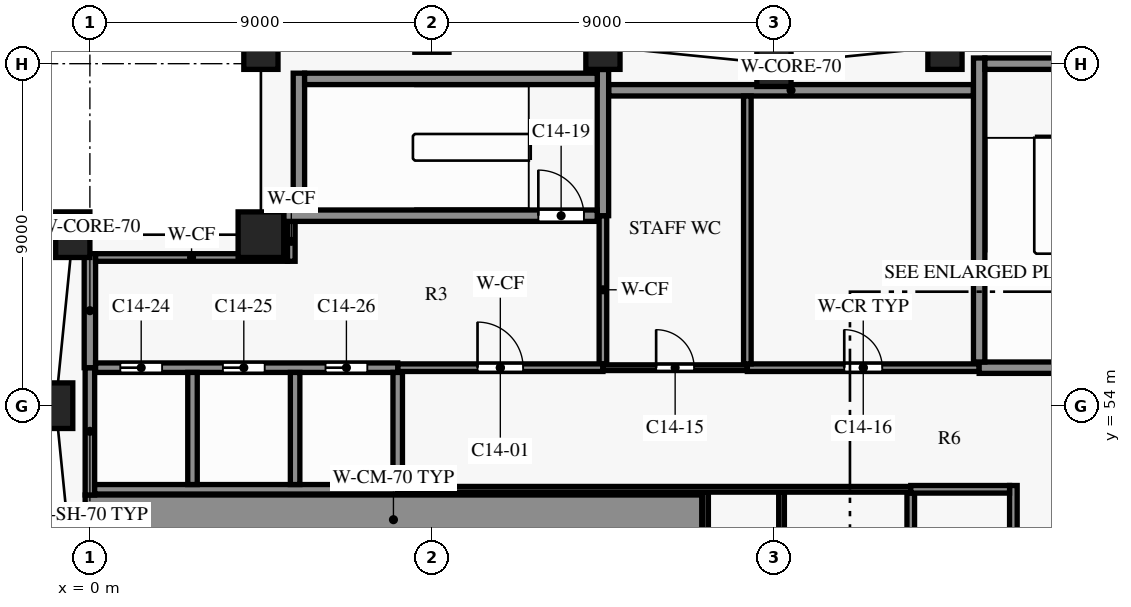
"""IFC4 building model, lengths in metres.
Left out: names, types, materials, properties, quantities, classifications, styles, units other than length and angle.
Written with IfcOpenShell. Run it as: python <this file> out.ifc"""

import sys

from ifc_helpers import new_model, si_unit, direction, frame, frame_2d, origin, origin_2d, place, context, subcontext, project, spatial, rectangle, extrude, element, fill, save


model = new_model("IFC4")
c1 = context("Model", 3, precision=1e-05, world=origin(), true_north=direction((0.0, 1.0)))
c2 = subcontext(c1, "Body", "Model", "MODEL_VIEW")
j1 = project(units=[si_unit("LENGTHUNIT", "METRE"), si_unit("PLANEANGLEUNIT", "RADIAN")], contexts=[c1])
p1 = place(None, origin())
s1 = spatial("IfcSite", under=j1, at=p1, CompositionType="ELEMENT")
p2 = place(p1, origin())
s2 = spatial("IfcBuilding", under=s1, at=p2, CompositionType="ELEMENT")
p3 = place(p2, frame((0.0, 0.0, 92.3)))
s3 = spatial("IfcBuildingStorey", under=s2, at=p3, CompositionType="ELEMENT", Elevation=92.3)
for number, where, z_axis, x_axis in (
    (1, (22.5, 63.45, 0.0), (0.0, 0.0, 1.0), (-0.995, -0.1, 0.0)),
    (2, (18.0, 63.0, 0.0), (0.0, 0.0, 1.0), (-1.0, 0.0, 0.0)),
    (3, (13.5, 63.45, 0.0), (0.0, 0.0, 1.0), (-0.995, 0.1, 0.0)),
    (4, (9.0, 63.9, 0.0), (0.0, 0.0, 1.0), (-1.0, 0.0, 0.0)),
    (5, (4.5, 63.45, 0.0), (0.0, 0.0, 1.0), (-0.995, -0.1, 0.0)),
    (6, (-0.45, 58.5, 0.0), (0.0, 0.0, 1.0), (-0.1, -0.995, 0.0)),
    (7, (-0.9, 54.0, 0.0), (0.0, 0.0, 1.0), (0.0, -1.0, 0.0)),
):
    element("IfcColumn", number, at=place(p3, frame(where, z_axis=z_axis, x_axis=x_axis)), inside=s3, PredefinedType="COLUMN", context=c2, shape_type="SweptSolid", body=[
        extrude(rectangle(XDim=0.9, YDim=1.2, at=origin_2d()), origin(), (0.0, 0.0, 1.0), 3.8),
    ])
p4 = place(p3, frame((4.5, 58.5, 0.0), z_axis=(0.0, 0.0, 1.0), x_axis=(1.0, 0.0, 0.0)))
e8 = element("IfcColumn", 8, at=p4, inside=s3, PredefinedType="COLUMN", context=c2, shape_type="SweptSolid", body=[
    extrude(rectangle(XDim=1.2, YDim=1.2, at=origin_2d()), origin(), (0.0, 0.0, 1.0), 3.8),
])
p5 = place(p3, frame((-0.125, 51.0, 0.0), z_axis=(0.0, 0.0, 1.0), x_axis=(1.0, 0.0, 0.0)))
e9 = element("IfcWall", 9, at=p5, inside=s3, PredefinedType="SHEAR", context=c2, shape_type="SweptSolid", body=[
    extrude(rectangle(XDim=16.225, YDim=1.3, at=frame_2d((8.113, 0.0))), origin(), (0.0, 0.0, 1.0), 3.5),
])
p6 = place(p3, frame((8.1, 51.8, 0.0), z_axis=(0.0, 0.0, 1.0), x_axis=(1.0, 0.0, 0.0)))
e10 = element("IfcWall", 10, at=p6, inside=s3, PredefinedType="PARTITIONING", context=c2, shape_type="SweptSolid", body=[
    extrude(rectangle(XDim=13.5, YDim=0.15, at=frame_2d((6.75, 0.0))), origin(), (0.0, 0.0, 1.0), 3.5),
])
p7 = place(p3, frame((21.6, 51.8, 0.0), z_axis=(0.0, 0.0, 1.0), x_axis=(1.0, 0.0, 0.0)))
e11 = element("IfcWall", 11, at=p7, inside=s3, PredefinedType="PARTITIONING", context=c2, shape_type="SweptSolid", body=[
    extrude(rectangle(XDim=2.6, YDim=0.2, at=frame_2d((1.3, 0.0))), origin(), (0.0, 0.0, 1.0), 3.5),
])
p8 = place(p3, frame((0.125, 51.8, 0.0), z_axis=(0.0, 0.0, 1.0), x_axis=(1.0, 0.0, 0.0)))
e12 = element("IfcWall", 12, at=p8, inside=s3, PredefinedType="SHEAR", context=c2, shape_type="SweptSolid", body=[
    extrude(rectangle(XDim=7.975, YDim=0.25, at=frame_2d((3.988, 0.0))), origin(), (0.0, 0.0, 1.0), 3.5),
])
p9 = place(p3, frame((8.1, 55.0, 0.0), z_axis=(0.0, 0.0, 1.0), x_axis=(1.0, 0.0, 0.0)))
e13 = element("IfcWall", 13, at=p9, inside=s3, PredefinedType="PARTITIONING", context=c2, shape_type="SweptSolid", body=[
    extrude(rectangle(XDim=5.4, YDim=0.2, at=frame_2d((2.7, 0.0))), origin(), (0.0, 0.0, 1.0), 3.5),
])
p10 = place(p9, frame((2.1, 0.0, 0.0)))
e14 = element("IfcOpeningElement", 14, at=p10, cuts=e13, PredefinedType="OPENING", context=c2, shape_type="SweptSolid", body=[
    extrude(rectangle(XDim=1.2, YDim=2.2, at=frame_2d((0.6, 1.1))), frame((0.0, 0.11, 0.0), z_axis=(0.0, -1.0, 0.0), x_axis=(1.0, 0.0, 0.0)), (0.0, 0.0, 1.0), 0.22),
])
p11 = place(p3, frame((13.5, 55.0, 0.0), z_axis=(0.0, 0.0, 1.0), x_axis=(1.0, 0.0, 0.0)))
e15 = element("IfcWall", 15, at=p11, inside=s3, PredefinedType="PARTITIONING", context=c2, shape_type="SweptSolid", body=[
    extrude(rectangle(XDim=3.8, YDim=0.15, at=frame_2d((1.9, 0.0))), origin(), (0.0, 0.0, 1.0), 3.5),
])
p12 = place(p11, frame((1.4, 0.0, 0.0)))
e16 = element("IfcOpeningElement", 16, at=p12, cuts=e15, PredefinedType="OPENING", context=c2, shape_type="SweptSolid", body=[
    extrude(rectangle(XDim=1.0, YDim=2.1, at=frame_2d((0.5, 1.05))), frame((0.0, 0.085, 0.0), z_axis=(0.0, -1.0, 0.0), x_axis=(1.0, 0.0, 0.0)), (0.0, 0.0, 1.0), 0.17),
])
p13 = place(p3, frame((17.3, 55.0, 0.0), z_axis=(0.0, 0.0, 1.0), x_axis=(1.0, 0.0, 0.0)))
e17 = element("IfcWall", 17, at=p13, inside=s3, PredefinedType="PARTITIONING", context=c2, shape_type="SweptSolid", body=[
    extrude(rectangle(XDim=6.1, YDim=0.2, at=frame_2d((3.05, 0.0))), origin(), (0.0, 0.0, 1.0), 3.5),
])
p14 = place(p13, frame((2.55, 0.0, 0.0)))
e18 = element("IfcOpeningElement", 18, at=p14, cuts=e17, PredefinedType="OPENING", context=c2, shape_type="SweptSolid", body=[
    extrude(rectangle(XDim=1.0, YDim=2.1, at=frame_2d((0.5, 1.05))), frame((0.0, 0.11, 0.0), z_axis=(0.0, -1.0, 0.0), x_axis=(1.0, 0.0, 0.0)), (0.0, 0.0, 1.0), 0.22),
])
p15 = place(p3, frame((0.15, 55.0, 0.0), z_axis=(0.0, 0.0, 1.0), x_axis=(1.0, 0.0, 0.0)))
e19 = element("IfcWall", 19, at=p15, inside=s3, PredefinedType="SHEAR", context=c2, shape_type="SweptSolid", body=[
    extrude(rectangle(XDim=7.95, YDim=0.25, at=frame_2d((3.975, 0.0))), origin(), (0.0, 0.0, 1.0), 3.5),
])
p16 = place(p15, frame((0.65, 0.0, 0.0)))
e20 = element("IfcOpeningElement", 20, at=p16, cuts=e19, PredefinedType="OPENING", context=c2, shape_type="SweptSolid", body=[
    extrude(rectangle(XDim=1.1, YDim=2.1, at=frame_2d((0.55, 1.05))), frame((0.0, 0.135, 0.0), z_axis=(0.0, -1.0, 0.0), x_axis=(1.0, 0.0, 0.0)), (0.0, 0.0, 1.0), 0.27),
])
p17 = place(p15, frame((3.35, 0.0, 0.0)))
e21 = element("IfcOpeningElement", 21, at=p17, cuts=e19, PredefinedType="OPENING", context=c2, shape_type="SweptSolid", body=[
    extrude(rectangle(XDim=1.1, YDim=2.1, at=frame_2d((0.55, 1.05))), frame((0.0, 0.135, 0.0), z_axis=(0.0, -1.0, 0.0), x_axis=(1.0, 0.0, 0.0)), (0.0, 0.0, 1.0), 0.27),
])
p18 = place(p15, frame((6.05, 0.0, 0.0)))
e22 = element("IfcOpeningElement", 22, at=p18, cuts=e19, PredefinedType="OPENING", context=c2, shape_type="SweptSolid", body=[
    extrude(rectangle(XDim=1.1, YDim=2.1, at=frame_2d((0.55, 1.05))), frame((0.0, 0.135, 0.0), z_axis=(0.0, -1.0, 0.0), x_axis=(1.0, 0.0, 0.0)), (0.0, 0.0, 1.0), 0.27),
])
p19 = place(p3, frame((23.4, 55.0, 0.0), z_axis=(0.0, 0.0, 1.0), x_axis=(1.0, 0.0, 0.0)))
e23 = element("IfcWall", 23, at=p19, inside=s3, PredefinedType="SHEAR", context=c2, shape_type="SweptSolid", body=[
    extrude(rectangle(XDim=3.45, YDim=0.3, at=frame_2d((1.725, 0.0))), origin(), (0.0, 0.0, 1.0), 3.5),
])
p20 = place(p3, frame((0.15, 57.9, 0.0), z_axis=(0.0, 0.0, 1.0), x_axis=(1.0, 0.0, 0.0)))
e24 = element("IfcWall", 24, at=p20, inside=s3, PredefinedType="PARTITIONING", context=c2, shape_type="SweptSolid", body=[
    extrude(rectangle(XDim=5.05, YDim=0.2, at=frame_2d((2.525, 0.0))), origin(), (0.0, 0.0, 1.0), 3.5),
])
p21 = place(p3, frame((5.1, 59.0, 0.0), z_axis=(0.0, 0.0, 1.0), x_axis=(1.0, 0.0, 0.0)))
e25 = element("IfcWall", 25, at=p21, inside=s3, PredefinedType="SHEAR", context=c2, shape_type="SweptSolid", body=[
    extrude(rectangle(XDim=8.25, YDim=0.3, at=frame_2d((4.125, 0.0))), origin(), (0.0, 0.0, 1.0), 3.5),
])
p22 = place(p21, frame((6.7, 0.0, 0.0)))
e26 = element("IfcOpeningElement", 26, at=p22, cuts=e25, PredefinedType="OPENING", context=c2, shape_type="SweptSolid", body=[
    extrude(rectangle(XDim=1.2, YDim=2.2, at=frame_2d((0.6, 1.1))), frame((0.0, 0.16, 0.0), z_axis=(0.0, -1.0, 0.0), x_axis=(1.0, 0.0, 0.0)), (0.0, 0.0, 1.0), 0.32),
])
p23 = place(p3, frame((13.65, 62.3, 0.0), z_axis=(0.0, 0.0, 1.0), x_axis=(1.0, 0.0, 0.0)))
e27 = element("IfcWall", 27, at=p23, inside=s3, PredefinedType="SHEAR", context=c2, shape_type="SweptSolid", body=[
    extrude(rectangle(XDim=9.6, YDim=0.3, at=frame_2d((4.8, 0.0))), origin(), (0.0, 0.0, 1.0), 3.5),
])
p24 = place(p3, frame((5.65, 62.6, 0.0), z_axis=(0.0, 0.0, 1.0), x_axis=(1.0, 0.0, 0.0)))
e28 = element("IfcWall", 28, at=p24, inside=s3, PredefinedType="SHEAR", context=c2, shape_type="SweptSolid", body=[
    extrude(rectangle(XDim=7.7, YDim=0.3, at=frame_2d((3.85, 0.0))), origin(), (0.0, 0.0, 1.0), 3.5),
])
p25 = place(p3, frame((23.55, 63.0, 0.0), z_axis=(0.0, 0.0, 1.0), x_axis=(1.0, 0.0, 0.0)))
e29 = element("IfcWall", 29, at=p25, inside=s3, PredefinedType="SHEAR", context=c2, shape_type="SweptSolid", body=[
    extrude(rectangle(XDim=3.3, YDim=0.3, at=frame_2d((1.65, 0.0))), origin(), (0.0, 0.0, 1.0), 3.5),
])
p26 = place(p3, frame((0.0, 55.0, 0.0), z_axis=(0.0, 0.0, 1.0), x_axis=(0.0, 1.0, 0.0)))
e30 = element("IfcWall", 30, at=p26, inside=s3, PredefinedType="SHEAR", context=c2, shape_type="SweptSolid", body=[
    extrude(rectangle(XDim=3.0, YDim=0.3, at=frame_2d((1.5, 0.0))), origin(), (0.0, 0.0, 1.0), 3.5),
])
p27 = place(p3, frame((0.0, 51.65, 0.0), z_axis=(0.0, 0.0, 1.0), x_axis=(0.0, 1.0, 0.0)))
e31 = element("IfcWall", 31, at=p27, inside=s3, PredefinedType="SHEAR", context=c2, shape_type="SweptSolid", body=[
    extrude(rectangle(XDim=3.35, YDim=0.25, at=frame_2d((1.675, 0.0))), origin(), (0.0, 0.0, 1.0), 3.5),
])
p28 = place(p3, frame((2.7, 51.925, 0.0), z_axis=(0.0, 0.0, 1.0), x_axis=(0.0, 1.0, 0.0)))
e32 = element("IfcWall", 32, at=p28, inside=s3, PredefinedType="SHEAR", context=c2, shape_type="SweptSolid", body=[
    extrude(rectangle(XDim=2.95, YDim=0.25, at=frame_2d((1.475, 0.0))), origin(), (0.0, 0.0, 1.0), 3.5),
])
p29 = place(p3, frame((5.3, 57.8, 0.0), z_axis=(0.0, 0.0, 1.0), x_axis=(0.0, 1.0, 0.0)))
e33 = element("IfcWall", 33, at=p29, inside=s3, PredefinedType="PARTITIONING", context=c2, shape_type="SweptSolid", body=[
    extrude(rectangle(XDim=1.05, YDim=0.2, at=frame_2d((0.525, 0.0))), origin(), (0.0, 0.0, 1.0), 3.5),
])
p30 = place(p3, frame((5.4, 51.925, 0.0), z_axis=(0.0, 0.0, 1.0), x_axis=(0.0, 1.0, 0.0)))
e34 = element("IfcWall", 34, at=p30, inside=s3, PredefinedType="SHEAR", context=c2, shape_type="SweptSolid", body=[
    extrude(rectangle(XDim=2.95, YDim=0.25, at=frame_2d((1.475, 0.0))), origin(), (0.0, 0.0, 1.0), 3.5),
])
p31 = place(p3, frame((5.5, 59.15, 0.0), z_axis=(0.0, 0.0, 1.0), x_axis=(0.0, 1.0, 0.0)))
e35 = element("IfcWall", 35, at=p31, inside=s3, PredefinedType="SHEAR", context=c2, shape_type="SweptSolid", body=[
    extrude(rectangle(XDim=3.6, YDim=0.3, at=frame_2d((1.8, 0.0))), origin(), (0.0, 0.0, 1.0), 3.5),
])
p32 = place(p3, frame((8.1, 51.925, 0.0), z_axis=(0.0, 0.0, 1.0), x_axis=(0.0, 1.0, 0.0)))
e36 = element("IfcWall", 36, at=p32, inside=s3, PredefinedType="SHEAR", context=c2, shape_type="SweptSolid", body=[
    extrude(rectangle(XDim=2.95, YDim=0.25, at=frame_2d((1.475, 0.0))), origin(), (0.0, 0.0, 1.0), 3.5),
])
p33 = place(p3, frame((13.5, 55.1, 0.0), z_axis=(0.0, 0.0, 1.0), x_axis=(0.0, 1.0, 0.0)))
e37 = element("IfcWall", 37, at=p33, inside=s3, PredefinedType="PARTITIONING", context=c2, shape_type="SweptSolid", body=[
    extrude(rectangle(XDim=3.9, YDim=0.2, at=frame_2d((1.95, 0.0))), origin(), (0.0, 0.0, 1.0), 3.5),
])
p34 = place(p3, frame((13.5, 59.0, 0.0), z_axis=(0.0, 0.0, 1.0), x_axis=(0.0, 1.0, 0.0)))
e38 = element("IfcWall", 38, at=p34, inside=s3, PredefinedType="SHEAR", context=c2, shape_type="SweptSolid", body=[
    extrude(rectangle(XDim=3.847, YDim=0.3, at=frame_2d((1.923, 0.0))), origin(), (0.0, 0.0, 1.0), 3.5),
])
p35 = place(p3, frame((16.2, 50.2, 0.0), z_axis=(0.0, 0.0, 1.0), x_axis=(0.0, 1.0, 0.0)))
e39 = element("IfcWall", 39, at=p35, inside=s3, PredefinedType="PARTITIONING", context=c2, shape_type="SweptSolid", body=[
    extrude(rectangle(XDim=1.525, YDim=0.15, at=frame_2d((0.763, 0.0))), origin(), (0.0, 0.0, 1.0), 3.5),
])
p36 = place(p3, frame((17.3, 55.1, 0.0), z_axis=(0.0, 0.0, 1.0), x_axis=(0.0, 1.0, 0.0)))
e40 = element("IfcWall", 40, at=p36, inside=s3, PredefinedType="PARTITIONING", context=c2, shape_type="SweptSolid", body=[
    extrude(rectangle(XDim=7.05, YDim=0.2, at=frame_2d((3.525, 0.0))), origin(), (0.0, 0.0, 1.0), 3.5),
])
p37 = place(p3, frame((18.2, 47.1, 0.0), z_axis=(0.0, 0.0, 1.0), x_axis=(0.0, 1.0, 0.0)))
e41 = element("IfcWall", 41, at=p37, inside=s3, PredefinedType="PARTITIONING", context=c2, shape_type="SweptSolid", body=[
    extrude(rectangle(XDim=4.625, YDim=0.15, at=frame_2d((2.312, 0.0))), origin(), (0.0, 0.0, 1.0), 3.5),
])
p38 = place(p3, frame((21.6, 47.1, 0.0), z_axis=(0.0, 0.0, 1.0), x_axis=(0.0, 1.0, 0.0)))
e42 = element("IfcWall", 42, at=p38, inside=s3, PredefinedType="PARTITIONING", context=c2, shape_type="SweptSolid", body=[
    extrude(rectangle(XDim=4.6, YDim=0.2, at=frame_2d((2.3, 0.0))), origin(), (0.0, 0.0, 1.0), 3.5),
])
p39 = place(p3, frame((23.4, 55.15, 0.0), z_axis=(0.0, 0.0, 1.0), x_axis=(0.0, 1.0, 0.0)))
e43 = element("IfcWall", 43, at=p39, inside=s3, PredefinedType="SHEAR", context=c2, shape_type="SweptSolid", body=[
    extrude(rectangle(XDim=8.0, YDim=0.3, at=frame_2d((4.0, 0.0))), origin(), (0.0, 0.0, 1.0), 3.5),
])
p40 = place(p3, frame((24.3, 46.9, 0.0), z_axis=(0.0, 0.0, 1.0), x_axis=(0.0, 1.0, 0.0)))
e44 = element("IfcWall", 44, at=p40, inside=s3, PredefinedType="SHEAR", context=c2, shape_type="SweptSolid", body=[
    extrude(rectangle(XDim=5.0, YDim=0.2, at=frame_2d((2.5, 0.0))), origin(), (0.0, 0.0, 1.0), 3.5),
])
p41 = place(p10, origin())
e45 = element("IfcDoor", 45, at=p41, inside=s3, OperationType="SINGLE_SWING_RIGHT", PredefinedType="DOOR", context=c2, shape_type="SweptSolid", body=[
    extrude(rectangle(XDim=1.2, YDim=2.2, at=frame_2d((0.6, 1.1))), frame((0.0, 0.025, 0.0), z_axis=(0.0, -1.0, 0.0), x_axis=(1.0, 0.0, 0.0)), (0.0, 0.0, 1.0), 0.05),
])
fill(e14, e45)
p42 = place(p12, origin())
e46 = element("IfcDoor", 46, at=p42, inside=s3, OperationType="SINGLE_SWING_LEFT", PredefinedType="DOOR", context=c2, shape_type="SweptSolid", body=[
    extrude(rectangle(XDim=1.0, YDim=2.1, at=frame_2d((0.5, 1.05))), frame((0.0, 0.025, 0.0), z_axis=(0.0, -1.0, 0.0), x_axis=(1.0, 0.0, 0.0)), (0.0, 0.0, 1.0), 0.05),
])
fill(e16, e46)
p43 = place(p14, origin())
e47 = element("IfcDoor", 47, at=p43, inside=s3, OperationType="SINGLE_SWING_RIGHT", PredefinedType="DOOR", context=c2, shape_type="SweptSolid", body=[
    extrude(rectangle(XDim=1.0, YDim=2.1, at=frame_2d((0.5, 1.05))), frame((0.0, 0.025, 0.0), z_axis=(0.0, -1.0, 0.0), x_axis=(1.0, 0.0, 0.0)), (0.0, 0.0, 1.0), 0.05),
])
fill(e18, e47)
p44 = place(p22, origin())
e48 = element("IfcDoor", 48, at=p44, inside=s3, OperationType="SINGLE_SWING_RIGHT", PredefinedType="DOOR", context=c2, shape_type="SweptSolid", body=[
    extrude(rectangle(XDim=1.2, YDim=2.2, at=frame_2d((0.6, 1.1))), frame((0.0, 0.025, 0.0), z_axis=(0.0, -1.0, 0.0), x_axis=(1.0, 0.0, 0.0)), (0.0, 0.0, 1.0), 0.05),
])
fill(e26, e48)
p45 = place(p16, origin())
e49 = element("IfcDoor", 49, at=p45, inside=s3, OperationType="DOUBLE_DOOR_SLIDING", PredefinedType="DOOR", context=c2, shape_type="SweptSolid", body=[
    extrude(rectangle(XDim=1.1, YDim=2.1, at=frame_2d((0.55, 1.05))), frame((0.0, 0.025, 0.0), z_axis=(0.0, -1.0, 0.0), x_axis=(1.0, 0.0, 0.0)), (0.0, 0.0, 1.0), 0.05),
])
fill(e20, e49)
p46 = place(p17, origin())
e50 = element("IfcDoor", 50, at=p46, inside=s3, OperationType="DOUBLE_DOOR_SLIDING", PredefinedType="DOOR", context=c2, shape_type="SweptSolid", body=[
    extrude(rectangle(XDim=1.1, YDim=2.1, at=frame_2d((0.55, 1.05))), frame((0.0, 0.025, 0.0), z_axis=(0.0, -1.0, 0.0), x_axis=(1.0, 0.0, 0.0)), (0.0, 0.0, 1.0), 0.05),
])
fill(e21, e50)
p47 = place(p18, origin())
e51 = element("IfcDoor", 51, at=p47, inside=s3, OperationType="DOUBLE_DOOR_SLIDING", PredefinedType="DOOR", context=c2, shape_type="SweptSolid", body=[
    extrude(rectangle(XDim=1.1, YDim=2.1, at=frame_2d((0.55, 1.05))), frame((0.0, 0.025, 0.0), z_axis=(0.0, -1.0, 0.0), x_axis=(1.0, 0.0, 0.0)), (0.0, 0.0, 1.0), 0.05),
])
fill(e22, e51)
save(model, sys.argv[1])
